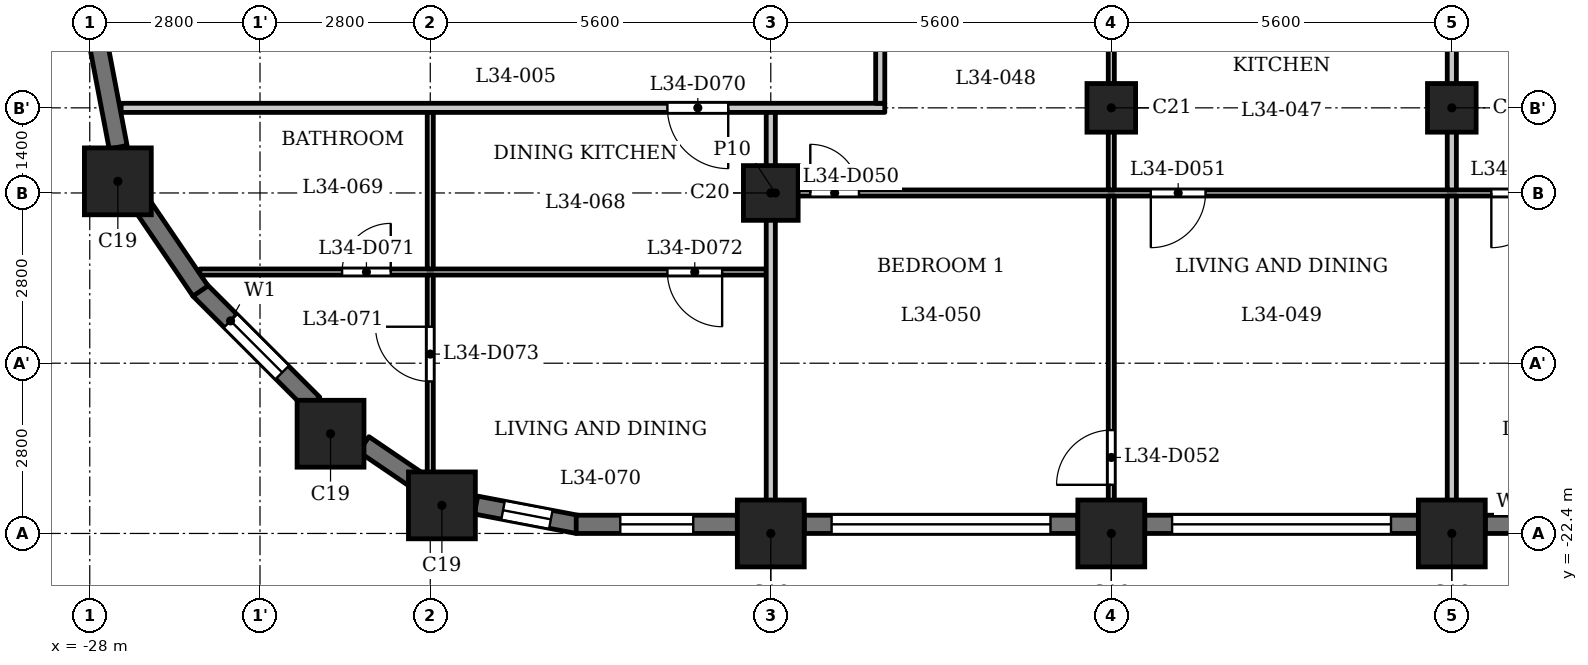
"""IFC4 building model, lengths in metres.
Left out: names, types, materials, properties, quantities, classifications, styles, units other than length and angle.
Written with IfcOpenShell. Run it as: python <this file> out.ifc"""

import sys

from ifc_helpers import new_model, si_unit, direction, frame, frame_2d, origin, origin_2d, place, context, subcontext, project, spatial, rectangle, extrude, element, fill, save


model = new_model("IFC4")
c1 = context("Model", 3, precision=1e-05, world=origin(), true_north=direction((0.0, 1.0)))
c2 = subcontext(c1, "Body", "Model", "MODEL_VIEW")
j1 = project(units=[si_unit("LENGTHUNIT", "METRE"), si_unit("PLANEANGLEUNIT", "RADIAN")], contexts=[c1])
p1 = place(None, origin())
s1 = spatial("IfcSite", under=j1, at=p1, CompositionType="ELEMENT")
p2 = place(p1, origin())
s2 = spatial("IfcBuilding", under=s1, at=p2, CompositionType="ELEMENT")
p3 = place(p2, frame((0.0, 0.0, 136.1)))
s3 = spatial("IfcBuildingStorey", under=s2, at=p3, CompositionType="ELEMENT", Elevation=136.1)
for number, where, z_axis, x_axis in (
    (1, (-22.209, -21.938, 0.0), (0.0, 0.0, 1.0), (1.0, 0.0, 0.0)),
    (2, (-16.8, -22.4, 0.0), (0.0, 0.0, 1.0), (1.0, 0.0, 0.0)),
    (3, (-11.2, -22.4, 0.0), (0.0, 0.0, 1.0), (1.0, 0.0, 0.0)),
    (4, (-5.6, -22.4, 0.0), (0.0, 0.0, 1.0), (1.0, 0.0, 0.0)),
    (5, (-27.538, -16.609, 0.0), (0.0, 0.0, 1.0), (1.0, 0.0, 0.0)),
    (6, (-24.04, -20.76, 0.0), (0.0, 0.0, 1.0), (1.0, 0.0, 0.0)),
):
    element("IfcColumn", number, at=place(p3, frame(where, z_axis=z_axis, x_axis=x_axis)), inside=s3, PredefinedType="COLUMN", context=c2, shape_type="SweptSolid", body=[
        extrude(rectangle(XDim=1.1, YDim=1.1, at=origin_2d()), origin(), (0.0, 0.0, 1.0), 3.5),
    ])
p4 = place(p3, frame((-16.8, -16.8, 0.0), z_axis=(0.0, 0.0, 1.0), x_axis=(1.0, 0.0, 0.0)))
e7 = element("IfcColumn", 7, at=p4, inside=s3, PredefinedType="COLUMN", context=c2, shape_type="SweptSolid", body=[
    extrude(rectangle(XDim=0.9, YDim=0.9, at=origin_2d()), origin(), (0.0, 0.0, 1.0), 3.5),
])
for number, where, z_axis, x_axis in (
    (8, (-11.2, -15.4, 0.0), (0.0, 0.0, 1.0), (1.0, 0.0, 0.0)),
    (9, (-5.6, -15.4, 0.0), (0.0, 0.0, 1.0), (1.0, 0.0, 0.0)),
):
    element("IfcColumn", number, at=place(p3, frame(where, z_axis=z_axis, x_axis=x_axis)), inside=s3, PredefinedType="COLUMN", context=c2, shape_type="SweptSolid", body=[
        extrude(rectangle(XDim=0.8, YDim=0.8, at=origin_2d()), origin(), (0.0, 0.0, 1.0), 3.5),
    ])
p5 = place(p3, frame((-26.197, -18.391, 0.0), z_axis=(0.0, 0.0, 1.0), x_axis=(0.707060717099, -0.707152842274, 0.0)))
e10 = element("IfcWall", 10, at=p5, inside=s3, PredefinedType="SOLIDWALL", context=c2, shape_type="SweptSolid", body=[
    extrude(rectangle(XDim=2.65, YDim=0.3, at=frame_2d((1.325, 0.0))), origin(), (0.0, 0.0, 1.0), 2.45),
])
p6 = place(p5, frame((0.725, 0.0, 0.6)))
e11 = element("IfcOpeningElement", 11, at=p6, cuts=e10, PredefinedType="OPENING", context=c2, shape_type="SweptSolid", body=[
    extrude(rectangle(XDim=1.2, YDim=1.55, at=frame_2d((0.6, 0.775))), frame((0.0, 0.16, 0.0), z_axis=(0.0, -1.0, 0.0), x_axis=(1.0, 0.0, 0.0)), (0.0, 0.0, 1.0), 0.32),
])
p7 = place(p3, frame((-23.492, -20.932, 0.0), z_axis=(0.0, 0.0, 1.0), x_axis=(0.826993959827, -0.562210806023, 0.0)))
e12 = element("IfcWall", 12, at=p7, inside=s3, PredefinedType="SOLIDWALL", context=c2, shape_type="SweptSolid", body=[
    extrude(rectangle(XDim=1.077, YDim=0.3, at=frame_2d((0.539, 0.0))), origin(), (0.0, 0.0, 1.0), 3.2),
])
p8 = place(p3, frame((-21.648, -21.933, 0.0), z_axis=(0.0, 0.0, 1.0), x_axis=(0.982297206936, -0.187329114784, 0.0)))
e13 = element("IfcWall", 13, at=p8, inside=s3, PredefinedType="SOLIDWALL", context=c2, shape_type="SweptSolid", body=[
    extrude(rectangle(XDim=1.706, YDim=0.3, at=frame_2d((0.853, 0.0))), origin(), (0.0, 0.0, 1.0), 2.45),
])
p9 = place(p8, frame((0.453, 0.0, 0.6)))
e14 = element("IfcOpeningElement", 14, at=p9, cuts=e13, PredefinedType="OPENING", context=c2, shape_type="SweptSolid", body=[
    extrude(rectangle(XDim=0.8, YDim=1.55, at=frame_2d((0.4, 0.775))), frame((0.0, 0.16, 0.0), z_axis=(0.0, -1.0, 0.0), x_axis=(1.0, 0.0, 0.0)), (0.0, 0.0, 1.0), 0.32),
])
p10 = place(p3, frame((-20.0, -22.25, 0.0), z_axis=(0.0, 0.0, 1.0), x_axis=(1.0, 0.0, 0.0)))
e15 = element("IfcWall", 15, at=p10, inside=s3, PredefinedType="SOLIDWALL", context=c2, shape_type="SweptSolid", body=[
    extrude(rectangle(XDim=2.65, YDim=0.3, at=frame_2d((1.325, 0.0))), origin(), (0.0, 0.0, 1.0), 2.45),
])
p11 = place(p10, frame((0.725, 0.0, 0.6)))
e16 = element("IfcOpeningElement", 16, at=p11, cuts=e15, PredefinedType="OPENING", context=c2, shape_type="SweptSolid", body=[
    extrude(rectangle(XDim=1.2, YDim=1.55, at=frame_2d((0.6, 0.775))), frame((0.0, 0.16, 0.0), z_axis=(0.0, -1.0, 0.0), x_axis=(1.0, 0.0, 0.0)), (0.0, 0.0, 1.0), 0.32),
])
p12 = place(p3, frame((-16.25, -22.25, 0.0), z_axis=(0.0, 0.0, 1.0), x_axis=(1.0, 0.0, 0.0)))
e17 = element("IfcWall", 17, at=p12, inside=s3, PredefinedType="SOLIDWALL", context=c2, shape_type="SweptSolid", body=[
    extrude(rectangle(XDim=4.5, YDim=0.3, at=frame_2d((2.25, 0.0))), origin(), (0.0, 0.0, 1.0), 2.45),
])
p13 = place(p12, frame((0.45, 0.0, 1.2)))
e18 = element("IfcOpeningElement", 18, at=p13, cuts=e17, PredefinedType="OPENING", context=c2, shape_type="SweptSolid", body=[
    extrude(rectangle(XDim=3.6, YDim=0.95, at=frame_2d((1.8, 0.475))), frame((0.0, 0.16, 0.0), z_axis=(0.0, -1.0, 0.0), x_axis=(1.0, 0.0, 0.0)), (0.0, 0.0, 1.0), 0.32),
])
p14 = place(p3, frame((-10.65, -22.25, 0.0), z_axis=(0.0, 0.0, 1.0), x_axis=(1.0, 0.0, 0.0)))
e19 = element("IfcWall", 19, at=p14, inside=s3, PredefinedType="SOLIDWALL", context=c2, shape_type="SweptSolid", body=[
    extrude(rectangle(XDim=4.5, YDim=0.3, at=frame_2d((2.25, 0.0))), origin(), (0.0, 0.0, 1.0), 2.45),
])
p15 = place(p14, frame((0.45, 0.0, 1.2)))
e20 = element("IfcOpeningElement", 20, at=p15, cuts=e19, PredefinedType="OPENING", context=c2, shape_type="SweptSolid", body=[
    extrude(rectangle(XDim=3.6, YDim=0.95, at=frame_2d((1.8, 0.475))), frame((0.0, 0.16, 0.0), z_axis=(0.0, -1.0, 0.0), x_axis=(1.0, 0.0, 0.0)), (0.0, 0.0, 1.0), 0.32),
])
p16 = place(p3, frame((-5.05, -22.25, 0.0), z_axis=(0.0, 0.0, 1.0), x_axis=(1.0, 0.0, 0.0)))
e21 = element("IfcWall", 21, at=p16, inside=s3, PredefinedType="SOLIDWALL", context=c2, shape_type="SweptSolid", body=[
    extrude(rectangle(XDim=4.5, YDim=0.3, at=frame_2d((2.25, 0.0))), origin(), (0.0, 0.0, 1.0), 2.45),
])
p17 = place(p16, frame((0.45, 0.0, 1.2)))
e22 = element("IfcOpeningElement", 22, at=p17, cuts=e21, PredefinedType="OPENING", context=c2, shape_type="SweptSolid", body=[
    extrude(rectangle(XDim=3.6, YDim=0.95, at=frame_2d((1.8, 0.475))), frame((0.0, 0.16, 0.0), z_axis=(0.0, -1.0, 0.0), x_axis=(1.0, 0.0, 0.0)), (0.0, 0.0, 1.0), 0.32),
])
p18 = place(p3, frame((-27.853, -14.372, 0.0), z_axis=(0.0, 0.0, 1.0), x_axis=(0.187302784601, -0.982302227871, 0.0)))
e23 = element("IfcWall", 23, at=p18, inside=s3, PredefinedType="SOLIDWALL", context=c2, shape_type="SweptSolid", body=[
    extrude(rectangle(XDim=1.706, YDim=0.3, at=frame_2d((0.853, 0.0))), origin(), (0.0, 0.0, 1.0), 2.45),
])
p19 = place(p3, frame((-27.138, -17.002, 0.0), z_axis=(0.0, 0.0, 1.0), x_axis=(0.562075160946, -0.827086158419, 0.0)))
e24 = element("IfcWall", 24, at=p19, inside=s3, PredefinedType="SOLIDWALL", context=c2, shape_type="SweptSolid", body=[
    extrude(rectangle(XDim=1.706, YDim=0.3, at=frame_2d((0.853, 0.0))), origin(), (0.0, 0.0, 1.0), 2.45),
])
p20 = place(p3, frame((-26.19, -18.1, 0.0), z_axis=(0.0, 0.0, 1.0), x_axis=(1.0, 0.0, 0.0)))
e25 = element("IfcWall", 25, at=p20, inside=s3, PredefinedType="PARTITIONING", context=c2, shape_type="SweptSolid", body=[
    extrude(rectangle(XDim=9.315, YDim=0.1, at=frame_2d((4.658, 0.0))), origin(), (0.0, 0.0, 1.0), 3.2),
])
p21 = place(p20, frame((2.34, 0.0, 0.0)))
e26 = element("IfcOpeningElement", 26, at=p21, cuts=e25, PredefinedType="OPENING", context=c2, shape_type="SweptSolid", body=[
    extrude(rectangle(XDim=0.8, YDim=2.1, at=frame_2d((0.4, 1.05))), frame((0.0, 0.06, 0.0), z_axis=(0.0, -1.0, 0.0), x_axis=(1.0, 0.0, 0.0)), (0.0, 0.0, 1.0), 0.12),
])
p22 = place(p20, frame((7.69, 0.0, 0.0)))
e27 = element("IfcOpeningElement", 27, at=p22, cuts=e25, PredefinedType="OPENING", context=c2, shape_type="SweptSolid", body=[
    extrude(rectangle(XDim=0.9, YDim=2.1, at=frame_2d((0.45, 1.05))), frame((0.0, 0.06, 0.0), z_axis=(0.0, -1.0, 0.0), x_axis=(1.0, 0.0, 0.0)), (0.0, 0.0, 1.0), 0.12),
])
p23 = place(p3, frame((-16.725, -16.8, 0.0), z_axis=(0.0, 0.0, 1.0), x_axis=(1.0, 0.0, 0.0)))
e28 = element("IfcWall", 28, at=p23, inside=s3, PredefinedType="PARTITIONING", context=c2, shape_type="SweptSolid", body=[
    extrude(rectangle(XDim=33.45, YDim=0.1, at=frame_2d((16.725, 0.0))), origin(), (0.0, 0.0, 1.0), 3.2),
])
p24 = place(p23, frame((0.575, 0.0, 0.0)))
e29 = element("IfcOpeningElement", 29, at=p24, cuts=e28, PredefinedType="OPENING", context=c2, shape_type="SweptSolid", body=[
    extrude(rectangle(XDim=0.8, YDim=2.1, at=frame_2d((0.4, 1.05))), frame((0.0, 0.06, 0.0), z_axis=(0.0, -1.0, 0.0), x_axis=(1.0, 0.0, 0.0)), (0.0, 0.0, 1.0), 0.12),
])
p25 = place(p23, frame((6.175, 0.0, 0.0)))
e30 = element("IfcOpeningElement", 30, at=p25, cuts=e28, PredefinedType="OPENING", context=c2, shape_type="SweptSolid", body=[
    extrude(rectangle(XDim=0.9, YDim=2.1, at=frame_2d((0.45, 1.05))), frame((0.0, 0.06, 0.0), z_axis=(0.0, -1.0, 0.0), x_axis=(1.0, 0.0, 0.0)), (0.0, 0.0, 1.0), 0.12),
])
p26 = place(p23, frame((15.275, 0.0, 0.0)))
e31 = element("IfcOpeningElement", 31, at=p26, cuts=e28, PredefinedType="OPENING", context=c2, shape_type="SweptSolid", body=[
    extrude(rectangle(XDim=0.8, YDim=2.1, at=frame_2d((0.4, 1.05))), frame((0.0, 0.06, 0.0), z_axis=(0.0, -1.0, 0.0), x_axis=(1.0, 0.0, 0.0)), (0.0, 0.0, 1.0), 0.12),
])
p27 = place(p23, frame((11.775, 0.0, 0.0)))
e32 = element("IfcOpeningElement", 32, at=p27, cuts=e28, PredefinedType="OPENING", context=c2, shape_type="SweptSolid", body=[
    extrude(rectangle(XDim=0.9, YDim=2.1, at=frame_2d((0.45, 1.05))), frame((0.0, 0.06, 0.0), z_axis=(0.0, -1.0, 0.0), x_axis=(1.0, 0.0, 0.0)), (0.0, 0.0, 1.0), 0.12),
])
p28 = place(p23, frame((17.275, 0.0, 0.0)))
e33 = element("IfcOpeningElement", 33, at=p28, cuts=e28, PredefinedType="OPENING", context=c2, shape_type="SweptSolid", body=[
    extrude(rectangle(XDim=0.8, YDim=2.1, at=frame_2d((0.4, 1.05))), frame((0.0, 0.06, 0.0), z_axis=(0.0, -1.0, 0.0), x_axis=(1.0, 0.0, 0.0)), (0.0, 0.0, 1.0), 0.12),
])
p29 = place(p23, frame((20.775, 0.0, 0.0)))
e34 = element("IfcOpeningElement", 34, at=p29, cuts=e28, PredefinedType="OPENING", context=c2, shape_type="SweptSolid", body=[
    extrude(rectangle(XDim=0.9, YDim=2.1, at=frame_2d((0.45, 1.05))), frame((0.0, 0.06, 0.0), z_axis=(0.0, -1.0, 0.0), x_axis=(1.0, 0.0, 0.0)), (0.0, 0.0, 1.0), 0.12),
])
p30 = place(p23, frame((31.575, 0.0, 0.0)))
e35 = element("IfcOpeningElement", 35, at=p30, cuts=e28, PredefinedType="OPENING", context=c2, shape_type="SweptSolid", body=[
    extrude(rectangle(XDim=0.8, YDim=2.1, at=frame_2d((0.4, 1.05))), frame((0.0, 0.06, 0.0), z_axis=(0.0, -1.0, 0.0), x_axis=(1.0, 0.0, 0.0)), (0.0, 0.0, 1.0), 0.12),
])
p31 = place(p23, frame((28.575, 0.0, 0.0)))
e36 = element("IfcOpeningElement", 36, at=p31, cuts=e28, PredefinedType="OPENING", context=c2, shape_type="SweptSolid", body=[
    extrude(rectangle(XDim=0.9, YDim=2.1, at=frame_2d((0.45, 1.05))), frame((0.0, 0.06, 0.0), z_axis=(0.0, -1.0, 0.0), x_axis=(1.0, 0.0, 0.0)), (0.0, 0.0, 1.0), 0.12),
])
p32 = place(p23, frame((23.725, 0.0, 0.0)))
e37 = element("IfcOpeningElement", 37, at=p32, cuts=e28, PredefinedType="OPENING", context=c2, shape_type="SweptSolid", body=[
    extrude(rectangle(XDim=0.9, YDim=2.1, at=frame_2d((0.45, 1.05))), frame((0.0, 0.06, 0.0), z_axis=(0.0, -1.0, 0.0), x_axis=(1.0, 0.0, 0.0)), (0.0, 0.0, 1.0), 0.12),
])
p33 = place(p23, frame((26.225, 0.0, 0.0)))
e38 = element("IfcOpeningElement", 38, at=p33, cuts=e28, PredefinedType="OPENING", context=c2, shape_type="SweptSolid", body=[
    extrude(rectangle(XDim=0.9, YDim=2.1, at=frame_2d((0.45, 1.05))), frame((0.0, 0.06, 0.0), z_axis=(0.0, -1.0, 0.0), x_axis=(1.0, 0.0, 0.0)), (0.0, 0.0, 1.0), 0.12),
])
p34 = place(p3, frame((-27.484, -15.4, 0.0), z_axis=(0.0, 0.0, 1.0), x_axis=(1.0, 0.0, 0.0)))
e39 = element("IfcWall", 39, at=p34, inside=s3, PredefinedType="PARTITIONING", context=c2, shape_type="SweptSolid", body=[
    extrude(rectangle(XDim=12.559, YDim=0.15, at=frame_2d((6.279, 0.0))), origin(), (0.0, 0.0, 1.0), 3.2),
])
p35 = place(p34, frame((8.984, 0.0, 0.0)))
e40 = element("IfcOpeningElement", 40, at=p35, cuts=e39, PredefinedType="OPENING", context=c2, shape_type="SweptSolid", body=[
    extrude(rectangle(XDim=1.0, YDim=2.1, at=frame_2d((0.5, 1.05))), frame((0.0, 0.085, 0.0), z_axis=(0.0, -1.0, 0.0), x_axis=(1.0, 0.0, 0.0)), (0.0, 0.0, 1.0), 0.17),
])
p36 = place(p3, frame((-22.4, -21.72, 0.0), z_axis=(0.0, 0.0, 1.0), x_axis=(0.0, 1.0, 0.0)))
e41 = element("IfcWall", 41, at=p36, inside=s3, PredefinedType="PARTITIONING", context=c2, shape_type="SweptSolid", body=[
    extrude(rectangle(XDim=3.57, YDim=0.1, at=frame_2d((1.785, 0.0))), origin(), (0.0, 0.0, 1.0), 3.2),
])
p37 = place(p36, frame((1.82, 0.0, 0.0)))
e42 = element("IfcOpeningElement", 42, at=p37, cuts=e41, PredefinedType="OPENING", context=c2, shape_type="SweptSolid", body=[
    extrude(rectangle(XDim=0.9, YDim=2.1, at=frame_2d((0.45, 1.05))), frame((0.0, 0.06, 0.0), z_axis=(0.0, -1.0, 0.0), x_axis=(1.0, 0.0, 0.0)), (0.0, 0.0, 1.0), 0.12),
])
p38 = place(p3, frame((-22.4, -18.05, 0.0), z_axis=(0.0, 0.0, 1.0), x_axis=(0.0, 1.0, 0.0)))
e43 = element("IfcWall", 43, at=p38, inside=s3, PredefinedType="PARTITIONING", context=c2, shape_type="SweptSolid", body=[
    extrude(rectangle(XDim=2.575, YDim=0.1, at=frame_2d((1.288, 0.0))), origin(), (0.0, 0.0, 1.0), 3.2),
])
p39 = place(p3, frame((-16.8, -22.93, 0.0), z_axis=(0.0, 0.0, 1.0), x_axis=(0.0, 1.0, 0.0)))
e44 = element("IfcWall", 44, at=p39, inside=s3, PredefinedType="PARTITIONING", context=c2, shape_type="SweptSolid", body=[
    extrude(rectangle(XDim=7.455, YDim=0.15, at=frame_2d((3.728, 0.0))), origin(), (0.0, 0.0, 1.0), 3.2),
])
p40 = place(p3, frame((-15.0, -15.325, 0.0), z_axis=(0.0, 0.0, 1.0), x_axis=(0.0, 1.0, 0.0)))
e45 = element("IfcWall", 45, at=p40, inside=s3, PredefinedType="PARTITIONING", context=c2, shape_type="SweptSolid", body=[
    extrude(rectangle(XDim=2.05, YDim=0.15, at=frame_2d((1.025, 0.0))), origin(), (0.0, 0.0, 1.0), 3.2),
])
p41 = place(p3, frame((-11.2, -22.93, 0.0), z_axis=(0.0, 0.0, 1.0), x_axis=(0.0, 1.0, 0.0)))
e46 = element("IfcWall", 46, at=p41, inside=s3, PredefinedType="PARTITIONING", context=c2, shape_type="SweptSolid", body=[
    extrude(rectangle(XDim=6.08, YDim=0.1, at=frame_2d((3.04, 0.0))), origin(), (0.0, 0.0, 1.0), 3.2),
])
p42 = place(p41, frame((1.33, 0.0, 0.0)))
e47 = element("IfcOpeningElement", 47, at=p42, cuts=e46, PredefinedType="OPENING", context=c2, shape_type="SweptSolid", body=[
    extrude(rectangle(XDim=0.9, YDim=2.1, at=frame_2d((0.45, 1.05))), frame((0.0, 0.06, 0.0), z_axis=(0.0, -1.0, 0.0), x_axis=(1.0, 0.0, 0.0)), (0.0, 0.0, 1.0), 0.12),
])
p43 = place(p3, frame((-11.2, -16.75, 0.0), z_axis=(0.0, 0.0, 1.0), x_axis=(0.0, 1.0, 0.0)))
e48 = element("IfcWall", 48, at=p43, inside=s3, PredefinedType="PARTITIONING", context=c2, shape_type="SweptSolid", body=[
    extrude(rectangle(XDim=3.475, YDim=0.1, at=frame_2d((1.738, 0.0))), origin(), (0.0, 0.0, 1.0), 3.2),
])
p44 = place(p3, frame((-5.6, -22.93, 0.0), z_axis=(0.0, 0.0, 1.0), x_axis=(0.0, 1.0, 0.0)))
e49 = element("IfcWall", 49, at=p44, inside=s3, PredefinedType="PARTITIONING", context=c2, shape_type="SweptSolid", body=[
    extrude(rectangle(XDim=6.08, YDim=0.15, at=frame_2d((3.04, 0.0))), origin(), (0.0, 0.0, 1.0), 3.2),
])
p45 = place(p3, frame((-5.6, -16.75, 0.0), z_axis=(0.0, 0.0, 1.0), x_axis=(0.0, 1.0, 0.0)))
e50 = element("IfcWall", 50, at=p45, inside=s3, PredefinedType="PARTITIONING", context=c2, shape_type="SweptSolid", body=[
    extrude(rectangle(XDim=3.475, YDim=0.15, at=frame_2d((1.738, 0.0))), origin(), (0.0, 0.0, 1.0), 3.2),
])
p46 = place(p24, origin())
e51 = element("IfcDoor", 51, at=p46, inside=s3, OperationType="SINGLE_SWING_RIGHT", PredefinedType="DOOR", context=c2, shape_type="SweptSolid", body=[
    extrude(rectangle(XDim=0.8, YDim=2.1, at=frame_2d((0.4, 1.05))), frame((0.0, 0.025, 0.0), z_axis=(0.0, -1.0, 0.0), x_axis=(1.0, 0.0, 0.0)), (0.0, 0.0, 1.0), 0.05),
])
fill(e29, e51)
p47 = place(p25, origin())
e52 = element("IfcDoor", 52, at=p47, inside=s3, OperationType="SINGLE_SWING_LEFT", PredefinedType="DOOR", context=c2, shape_type="SweptSolid", body=[
    extrude(rectangle(XDim=0.9, YDim=2.1, at=frame_2d((0.45, 1.05))), frame((0.0, 0.025, 0.0), z_axis=(0.0, -1.0, 0.0), x_axis=(1.0, 0.0, 0.0)), (0.0, 0.0, 1.0), 0.05),
])
fill(e30, e52)
p48 = place(p42, origin())
e53 = element("IfcDoor", 53, at=p48, inside=s3, OperationType="SINGLE_SWING_RIGHT", PredefinedType="DOOR", context=c2, shape_type="SweptSolid", body=[
    extrude(rectangle(XDim=0.9, YDim=2.1, at=frame_2d((0.45, 1.05))), frame((0.0, 0.025, 0.0), z_axis=(0.0, -1.0, 0.0), x_axis=(1.0, 0.0, 0.0)), (0.0, 0.0, 1.0), 0.05),
])
fill(e47, e53)
p49 = place(p27, origin())
e54 = element("IfcDoor", 54, at=p49, inside=s3, OperationType="SINGLE_SWING_LEFT", PredefinedType="DOOR", context=c2, shape_type="SweptSolid", body=[
    extrude(rectangle(XDim=0.9, YDim=2.1, at=frame_2d((0.45, 1.05))), frame((0.0, 0.025, 0.0), z_axis=(0.0, -1.0, 0.0), x_axis=(1.0, 0.0, 0.0)), (0.0, 0.0, 1.0), 0.05),
])
fill(e32, e54)
p50 = place(p35, origin())
e55 = element("IfcDoor", 55, at=p50, inside=s3, OperationType="SINGLE_SWING_RIGHT", PredefinedType="DOOR", context=c2, shape_type="SweptSolid", body=[
    extrude(rectangle(XDim=1.0, YDim=2.1, at=frame_2d((0.5, 1.05))), frame((0.0, 0.025, 0.0), z_axis=(0.0, -1.0, 0.0), x_axis=(1.0, 0.0, 0.0)), (0.0, 0.0, 1.0), 0.05),
])
fill(e40, e55)
p51 = place(p21, origin())
e56 = element("IfcDoor", 56, at=p51, inside=s3, OperationType="SINGLE_SWING_LEFT", PredefinedType="DOOR", context=c2, shape_type="SweptSolid", body=[
    extrude(rectangle(XDim=0.8, YDim=2.1, at=frame_2d((0.4, 1.05))), frame((0.0, 0.025, 0.0), z_axis=(0.0, -1.0, 0.0), x_axis=(1.0, 0.0, 0.0)), (0.0, 0.0, 1.0), 0.05),
])
fill(e26, e56)
p52 = place(p22, origin())
e57 = element("IfcDoor", 57, at=p52, inside=s3, OperationType="SINGLE_SWING_RIGHT", PredefinedType="DOOR", context=c2, shape_type="SweptSolid", body=[
    extrude(rectangle(XDim=0.9, YDim=2.1, at=frame_2d((0.45, 1.05))), frame((0.0, 0.025, 0.0), z_axis=(0.0, -1.0, 0.0), x_axis=(1.0, 0.0, 0.0)), (0.0, 0.0, 1.0), 0.05),
])
fill(e27, e57)
p53 = place(p37, origin())
e58 = element("IfcDoor", 58, at=p53, inside=s3, OperationType="SINGLE_SWING_LEFT", PredefinedType="DOOR", context=c2, shape_type="SweptSolid", body=[
    extrude(rectangle(XDim=0.9, YDim=2.1, at=frame_2d((0.45, 1.05))), frame((0.0, 0.025, 0.0), z_axis=(0.0, -1.0, 0.0), x_axis=(1.0, 0.0, 0.0)), (0.0, 0.0, 1.0), 0.05),
])
fill(e42, e58)
p54 = place(p6, origin())
e59 = element("IfcWindow", 59, at=p54, inside=s3, PartitioningType="SINGLE_PANEL", PredefinedType="WINDOW", context=c2, shape_type="SweptSolid", body=[
    extrude(rectangle(XDim=1.2, YDim=1.55, at=frame_2d((0.6, 0.775))), frame((0.0, 0.03, 0.0), z_axis=(0.0, -1.0, 0.0), x_axis=(1.0, 0.0, 0.0)), (0.0, 0.0, 1.0), 0.06),
])
fill(e11, e59)
p55 = place(p9, origin())
e60 = element("IfcWindow", 60, at=p55, inside=s3, PartitioningType="SINGLE_PANEL", PredefinedType="WINDOW", context=c2, shape_type="SweptSolid", body=[
    extrude(rectangle(XDim=0.8, YDim=1.55, at=frame_2d((0.4, 0.775))), frame((0.0, 0.03, 0.0), z_axis=(0.0, -1.0, 0.0), x_axis=(1.0, 0.0, 0.0)), (0.0, 0.0, 1.0), 0.06),
])
fill(e14, e60)
p56 = place(p11, origin())
e61 = element("IfcWindow", 61, at=p56, inside=s3, PartitioningType="SINGLE_PANEL", PredefinedType="WINDOW", context=c2, shape_type="SweptSolid", body=[
    extrude(rectangle(XDim=1.2, YDim=1.55, at=frame_2d((0.6, 0.775))), frame((0.0, 0.03, 0.0), z_axis=(0.0, -1.0, 0.0), x_axis=(1.0, 0.0, 0.0)), (0.0, 0.0, 1.0), 0.06),
])
fill(e16, e61)
p57 = place(p13, origin())
e62 = element("IfcWindow", 62, at=p57, inside=s3, PartitioningType="SINGLE_PANEL", PredefinedType="WINDOW", context=c2, shape_type="SweptSolid", body=[
    extrude(rectangle(XDim=3.6, YDim=0.95, at=frame_2d((1.8, 0.475))), frame((0.0, 0.03, 0.0), z_axis=(0.0, -1.0, 0.0), x_axis=(1.0, 0.0, 0.0)), (0.0, 0.0, 1.0), 0.06),
])
fill(e18, e62)
p58 = place(p15, origin())
e63 = element("IfcWindow", 63, at=p58, inside=s3, PartitioningType="SINGLE_PANEL", PredefinedType="WINDOW", context=c2, shape_type="SweptSolid", body=[
    extrude(rectangle(XDim=3.6, YDim=0.95, at=frame_2d((1.8, 0.475))), frame((0.0, 0.03, 0.0), z_axis=(0.0, -1.0, 0.0), x_axis=(1.0, 0.0, 0.0)), (0.0, 0.0, 1.0), 0.06),
])
fill(e20, e63)
save(model, sys.argv[1])
